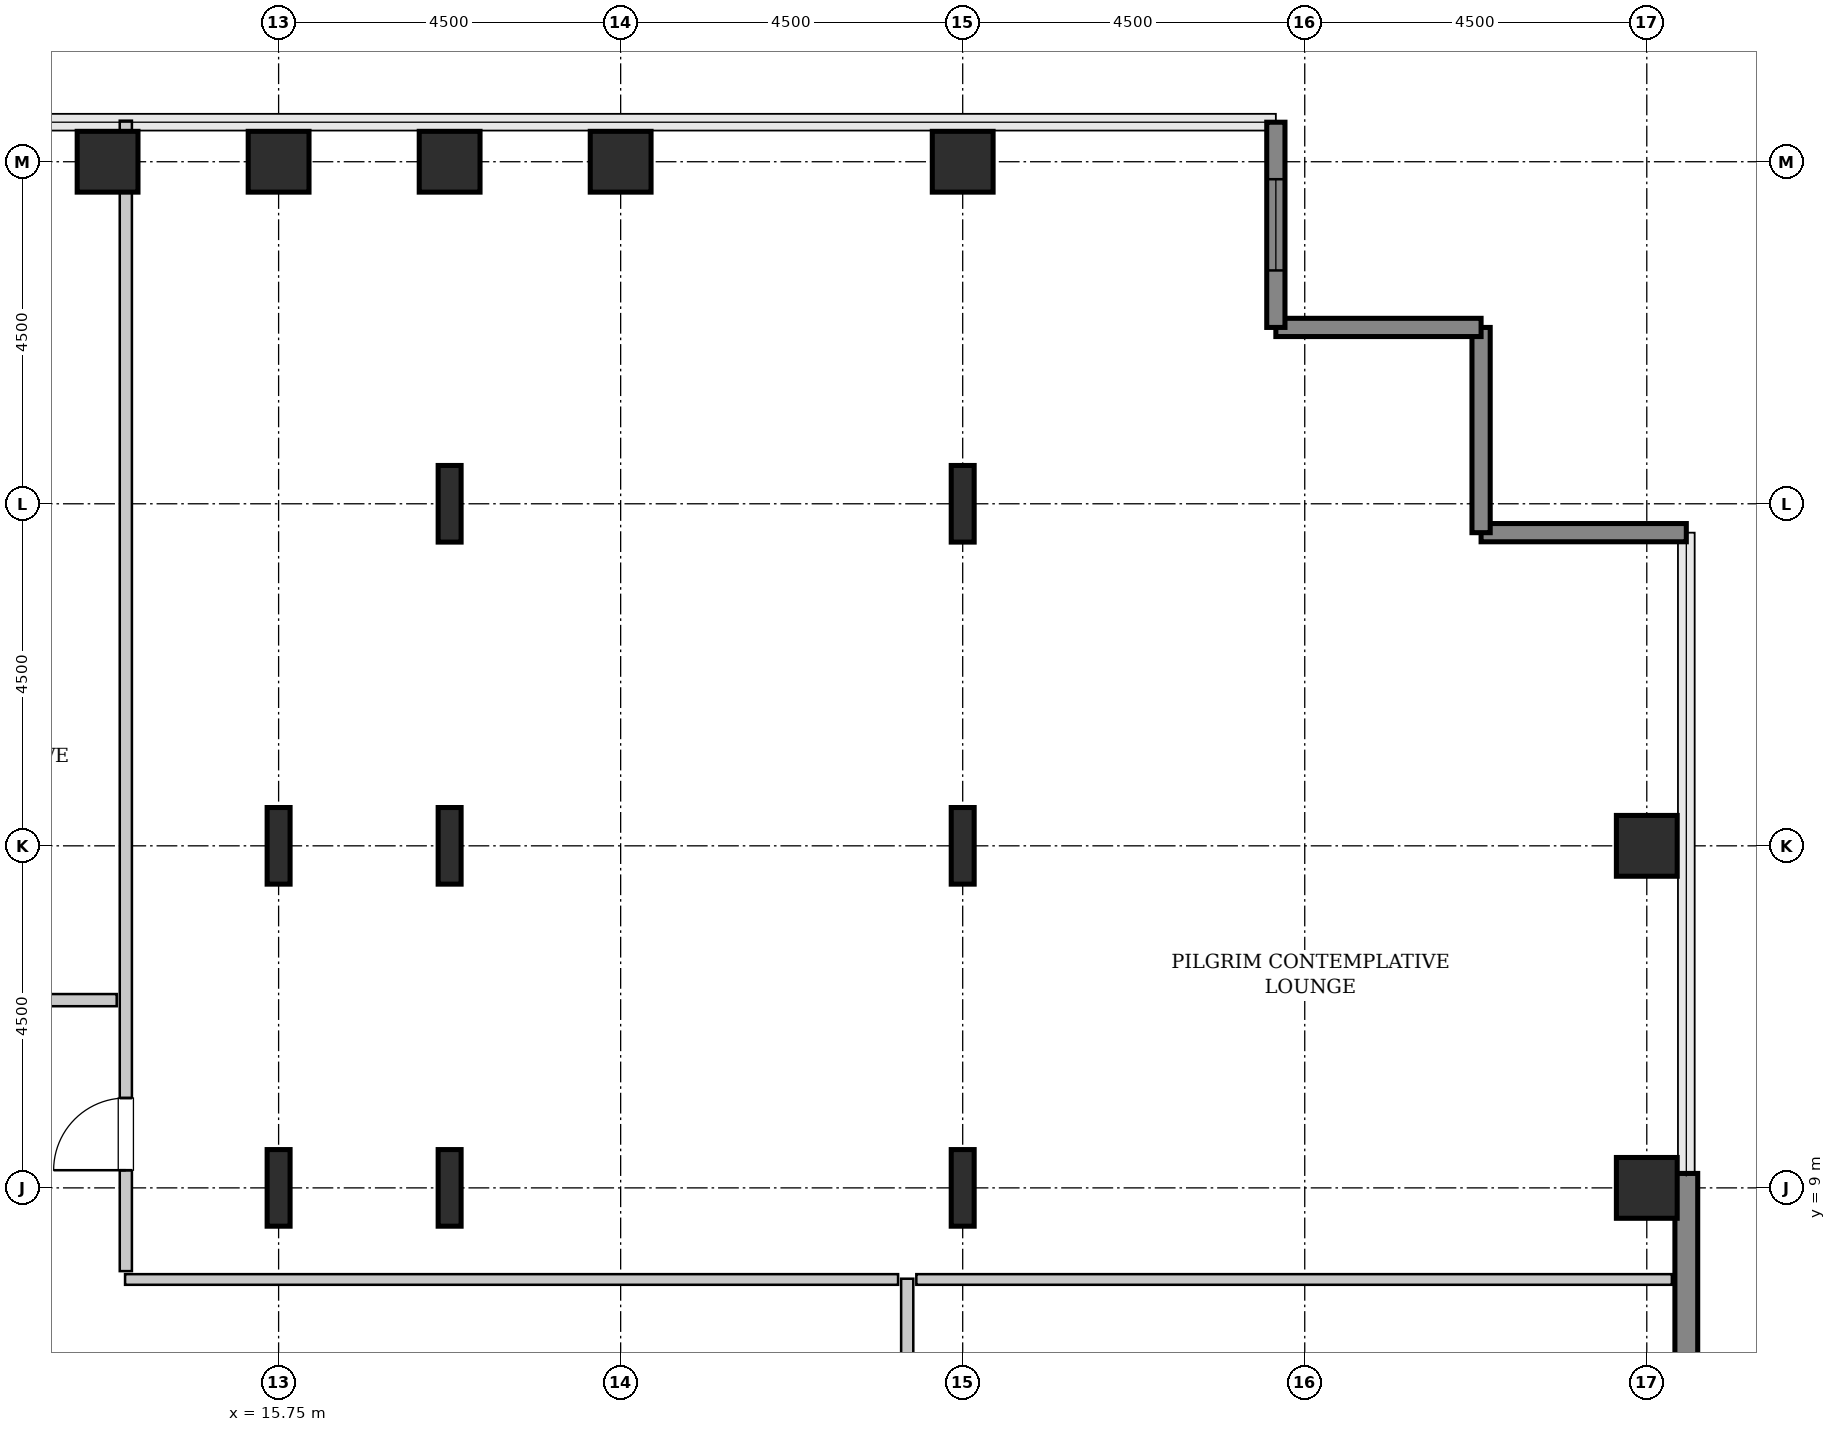
"""IFC4 building model, lengths in metres.
Left out: names, types, materials, properties, quantities, classifications, styles, units other than length and angle.
Written with IfcOpenShell. Run it as: python <this file> out.ifc"""

import sys

from ifc_helpers import new_model, si_unit, direction, frame, frame_2d, origin, origin_2d, place, context, subcontext, project, spatial, rectangle, hollow_rectangle, i_section, extrude, source, transform, mapped, element, fill, save


model = new_model("IFC4")
c1 = context("Model", 3, precision=1e-05, world=origin(), true_north=direction((0.0, 1.0)))
c2 = subcontext(c1, "Body", "Model", "MODEL_VIEW")
j1 = project(units=[si_unit("LENGTHUNIT", "METRE"), si_unit("PLANEANGLEUNIT", "RADIAN")], contexts=[c1])
p1 = place(None, origin())
s1 = spatial("IfcSite", under=j1, at=p1, CompositionType="ELEMENT")
p2 = place(p1, origin())
s2 = spatial("IfcBuilding", under=s1, at=p2, CompositionType="ELEMENT")
p3 = place(p2, frame((0.0, 0.0, 113.6)))
s3 = spatial("IfcBuildingStorey", under=s2, at=p3, CompositionType="ELEMENT", Elevation=113.6)
m1 = source(origin(), c2, "Body", "SweptSolid", [
    extrude(hollow_rectangle(XDim=0.8, YDim=0.8, WallThickness=0.04, InnerFilletRadius=0.04, OuterFilletRadius=0.08, at=origin_2d()), origin(), (0.0, 0.0, 1.0), 3.8),
])
p4 = place(p3, frame((13.5, 22.5, 0.0), z_axis=(0.0, 0.0, 1.0), x_axis=(1.0, 0.0, 0.0)))
e1 = element("IfcColumn", 1, at=p4, inside=s3, PredefinedType="COLUMN", context=c2, shape_type="MappedRepresentation", body=[
    mapped(m1, transform((0.0, 0.0, 0.0), x_axis=(1.0, 0.0, 0.0), y_axis=(0.0, 1.0, 0.0), z_axis=(0.0, 0.0, 1.0), scale=1.0)),
])
m2 = source(origin(), c2, "Body", "SweptSolid", [
    extrude(i_section(OverallWidth=0.302, OverallDepth=1.008, WebThickness=0.021, FlangeThickness=0.04, FilletRadius=0.03, at=origin_2d()), origin(), (0.0, 0.0, 1.0), 3.8),
])
for number, where, z_axis, x_axis in (
    (2, (15.75, 9.0, 0.0), (0.0, 0.0, 1.0), (1.0, 0.0, 0.0)),
    (3, (15.75, 13.5, 0.0), (0.0, 0.0, 1.0), (1.0, 0.0, 0.0)),
):
    element("IfcColumn", number, at=place(p3, frame(where, z_axis=z_axis, x_axis=x_axis)), inside=s3, PredefinedType="COLUMN", context=c2, shape_type="MappedRepresentation", body=[
        mapped(m2, transform((0.0, 0.0, 0.0), x_axis=(1.0, 0.0, 0.0), y_axis=(0.0, 1.0, 0.0), z_axis=(0.0, 0.0, 1.0), scale=1.0)),
    ])
p5 = place(p3, frame((15.75, 22.5, 0.0), z_axis=(0.0, 0.0, 1.0), x_axis=(1.0, 0.0, 0.0)))
e4 = element("IfcColumn", 4, at=p5, inside=s3, PredefinedType="COLUMN", context=c2, shape_type="MappedRepresentation", body=[
    mapped(m1, transform((0.0, 0.0, 0.0), x_axis=(1.0, 0.0, 0.0), y_axis=(0.0, 1.0, 0.0), z_axis=(0.0, 0.0, 1.0), scale=1.0)),
])
for number, where, z_axis, x_axis in (
    (5, (18.0, 9.0, 0.0), (0.0, 0.0, 1.0), (1.0, 0.0, 0.0)),
    (6, (18.0, 13.5, 0.0), (0.0, 0.0, 1.0), (1.0, 0.0, 0.0)),
    (7, (18.0, 18.0, 0.0), (0.0, 0.0, 1.0), (1.0, 0.0, 0.0)),
):
    element("IfcColumn", number, at=place(p3, frame(where, z_axis=z_axis, x_axis=x_axis)), inside=s3, PredefinedType="COLUMN", context=c2, shape_type="MappedRepresentation", body=[
        mapped(m2, transform((0.0, 0.0, 0.0), x_axis=(1.0, 0.0, 0.0), y_axis=(0.0, 1.0, 0.0), z_axis=(0.0, 0.0, 1.0), scale=1.0)),
    ])
for number, where, z_axis, x_axis in (
    (8, (18.0, 22.5, 0.0), (0.0, 0.0, 1.0), (1.0, 0.0, 0.0)),
    (9, (20.25, 22.5, 0.0), (0.0, 0.0, 1.0), (1.0, 0.0, 0.0)),
):
    element("IfcColumn", number, at=place(p3, frame(where, z_axis=z_axis, x_axis=x_axis)), inside=s3, PredefinedType="COLUMN", context=c2, shape_type="MappedRepresentation", body=[
        mapped(m1, transform((0.0, 0.0, 0.0), x_axis=(1.0, 0.0, 0.0), y_axis=(0.0, 1.0, 0.0), z_axis=(0.0, 0.0, 1.0), scale=1.0)),
    ])
for number, where, z_axis, x_axis in (
    (10, (24.75, 9.0, 0.0), (0.0, 0.0, 1.0), (1.0, 0.0, 0.0)),
    (11, (24.75, 13.5, 0.0), (0.0, 0.0, 1.0), (1.0, 0.0, 0.0)),
    (12, (24.75, 18.0, 0.0), (0.0, 0.0, 1.0), (1.0, 0.0, 0.0)),
):
    element("IfcColumn", number, at=place(p3, frame(where, z_axis=z_axis, x_axis=x_axis)), inside=s3, PredefinedType="COLUMN", context=c2, shape_type="MappedRepresentation", body=[
        mapped(m2, transform((0.0, 0.0, 0.0), x_axis=(1.0, 0.0, 0.0), y_axis=(0.0, 1.0, 0.0), z_axis=(0.0, 0.0, 1.0), scale=1.0)),
    ])
for number, where, z_axis, x_axis in (
    (13, (24.75, 22.5, 0.0), (0.0, 0.0, 1.0), (1.0, 0.0, 0.0)),
    (14, (33.75, 9.0, 0.0), (0.0, 0.0, 1.0), (1.0, 0.0, 0.0)),
    (15, (33.75, 13.5, 0.0), (0.0, 0.0, 1.0), (1.0, 0.0, 0.0)),
):
    element("IfcColumn", number, at=place(p3, frame(where, z_axis=z_axis, x_axis=x_axis)), inside=s3, PredefinedType="COLUMN", context=c2, shape_type="MappedRepresentation", body=[
        mapped(m1, transform((0.0, 0.0, 0.0), x_axis=(1.0, 0.0, 0.0), y_axis=(0.0, 1.0, 0.0), z_axis=(0.0, 0.0, 1.0), scale=1.0)),
    ])
m3 = source(origin(), c2, "Body", "SweptSolid", [
    extrude(rectangle(XDim=4.88, YDim=0.3, at=frame_2d((2.44, 0.0))), origin(), (0.0, 0.0, 1.0), 3.55),
])
p6 = place(p3, frame((34.27, 4.31, 0.0), z_axis=(0.0, 0.0, 1.0), x_axis=(0.0, 1.0, 0.0)))
e16 = element("IfcWall", 16, at=p6, inside=s3, PredefinedType="SHEAR", context=c2, shape_type="MappedRepresentation", body=[
    mapped(m3, transform((0.0, 0.0, 0.0), x_axis=(1.0, 0.0, 0.0), y_axis=(0.0, 1.0, 0.0), z_axis=(0.0, 0.0, 1.0), scale=1.0)),
])
m4 = source(origin(), c2, "Body", "SweptSolid", [
    extrude(rectangle(XDim=2.7, YDim=0.24, at=frame_2d((1.35, 0.0))), origin(), (0.0, 0.0, 1.0), 3.55),
])
for number, where, z_axis, x_axis in (
    (17, (34.27, 17.62, 0.0), (0.0, 0.0, 1.0), (-1.0, 0.0, 0.0)),
    (18, (31.57, 17.62, 0.0), (0.0, 0.0, 1.0), (0.0, 1.0, 0.0)),
    (19, (31.57, 20.32, 0.0), (0.0, 0.0, 1.0), (-1.0, 0.0, 0.0)),
):
    element("IfcWall", number, at=place(p3, frame(where, z_axis=z_axis, x_axis=x_axis)), inside=s3, PredefinedType="SHEAR", context=c2, shape_type="MappedRepresentation", body=[
        mapped(m4, transform((0.0, 0.0, 0.0), x_axis=(1.0, 0.0, 0.0), y_axis=(0.0, 1.0, 0.0), z_axis=(0.0, 0.0, 1.0), scale=1.0)),
    ])
p7 = place(p3, frame((28.87, 20.32, 0.0), z_axis=(0.0, 0.0, 1.0), x_axis=(0.0, 1.0, 0.0)))
e20 = element("IfcWall", 20, at=p7, inside=s3, PredefinedType="SHEAR", context=c2, shape_type="MappedRepresentation", body=[
    mapped(m4, transform((0.0, 0.0, 0.0), x_axis=(1.0, 0.0, 0.0), y_axis=(0.0, 1.0, 0.0), z_axis=(0.0, 0.0, 1.0), scale=1.0)),
])
p8 = place(p7, frame((0.75, 0.0, 0.85)))
e21 = element("IfcOpeningElement", 21, at=p8, cuts=e20, PredefinedType="OPENING", context=c2, shape_type="SweptSolid", body=[
    extrude(rectangle(XDim=1.2, YDim=1.8, at=frame_2d((0.6, 0.9))), frame((0.0, 0.13, 0.0), z_axis=(0.0, -1.0, 0.0), x_axis=(1.0, 0.0, 0.0)), (0.0, 0.0, 1.0), 0.26),
])
m5 = source(origin(), c2, "Body", "SweptSolid", [
    extrude(rectangle(XDim=15.5, YDim=0.16, at=frame_2d((7.75, 0.0))), origin(), (0.0, 0.0, 1.0), 3.535),
])
p9 = place(p3, frame((24.02, -7.695, 0.0), z_axis=(0.0, 0.0, 1.0), x_axis=(0.0, 1.0, 0.0)))
e22 = element("IfcWall", 22, at=p9, inside=s3, PredefinedType="PARTITIONING", context=c2, shape_type="MappedRepresentation", body=[
    mapped(m5, transform((0.0, 0.0, 0.0), x_axis=(1.0, 0.0, 0.0), y_axis=(0.0, 1.0, 0.0), z_axis=(0.0, 0.0, 1.0), scale=1.0)),
])
p10 = place(p9, frame((9.47, 0.0, 0.0)))
e23 = element("IfcOpeningElement", 23, at=p10, cuts=e22, PredefinedType="OPENING", context=c2, shape_type="SweptSolid", body=[
    extrude(rectangle(XDim=0.95, YDim=2.1, at=frame_2d((0.475, 1.05))), frame((0.0, 0.09, 0.0), z_axis=(0.0, -1.0, 0.0), x_axis=(1.0, 0.0, 0.0)), (0.0, 0.0, 1.0), 0.18),
])
m6 = source(origin(), c2, "Body", "SweptSolid", [
    extrude(rectangle(XDim=10.17, YDim=0.14, at=frame_2d((5.085, 0.0))), origin(), (0.0, 0.0, 1.0), 3.535),
])
p11 = place(p3, frame((13.73, 7.795, 0.0), z_axis=(0.0, 0.0, 1.0), x_axis=(1.0, 0.0, 0.0)))
e24 = element("IfcWall", 24, at=p11, inside=s3, PredefinedType="PARTITIONING", context=c2, shape_type="MappedRepresentation", body=[
    mapped(m6, transform((0.0, 0.0, 0.0), x_axis=(1.0, 0.0, 0.0), y_axis=(0.0, 1.0, 0.0), z_axis=(0.0, 0.0, 1.0), scale=1.0)),
])
m7 = source(origin(), c2, "Body", "SweptSolid", [
    extrude(rectangle(XDim=9.94, YDim=0.14, at=frame_2d((4.97, 0.0))), origin(), (0.0, 0.0, 1.0), 3.535),
])
p12 = place(p3, frame((24.14, 7.795, 0.0), z_axis=(0.0, 0.0, 1.0), x_axis=(1.0, 0.0, 0.0)))
e25 = element("IfcWall", 25, at=p12, inside=s3, PredefinedType="PARTITIONING", context=c2, shape_type="MappedRepresentation", body=[
    mapped(m7, transform((0.0, 0.0, 0.0), x_axis=(1.0, 0.0, 0.0), y_axis=(0.0, 1.0, 0.0), z_axis=(0.0, 0.0, 1.0), scale=1.0)),
])
m8 = source(origin(), c2, "Body", "SweptSolid", [
    extrude(rectangle(XDim=15.135, YDim=0.16, at=frame_2d((7.567, 0.0))), origin(), (0.0, 0.0, 1.0), 3.535),
])
p13 = place(p3, frame((13.74, 7.905, 0.0), z_axis=(0.0, 0.0, 1.0), x_axis=(0.0, 1.0, 0.0)))
e26 = element("IfcWall", 26, at=p13, inside=s3, PredefinedType="PARTITIONING", context=c2, shape_type="MappedRepresentation", body=[
    mapped(m8, transform((0.0, 0.0, 0.0), x_axis=(1.0, 0.0, 0.0), y_axis=(0.0, 1.0, 0.0), z_axis=(0.0, 0.0, 1.0), scale=1.0)),
])
p14 = place(p13, frame((1.327, 0.0, 0.0)))
e27 = element("IfcOpeningElement", 27, at=p14, cuts=e26, PredefinedType="OPENING", context=c2, shape_type="SweptSolid", body=[
    extrude(rectangle(XDim=0.95, YDim=2.1, at=frame_2d((0.475, 1.05))), frame((0.0, 0.09, 0.0), z_axis=(0.0, -1.0, 0.0), x_axis=(1.0, 0.0, 0.0)), (0.0, 0.0, 1.0), 0.18),
])
m9 = source(origin(), c2, "Body", "SweptSolid", [
    extrude(rectangle(XDim=3.66, YDim=0.16, at=frame_2d((1.83, 0.0))), origin(), (0.0, 0.0, 1.0), 3.535),
])
p15 = place(p3, frame((9.96, 11.47, 0.0), z_axis=(0.0, 0.0, 1.0), x_axis=(1.0, 0.0, 0.0)))
e28 = element("IfcWall", 28, at=p15, inside=s3, PredefinedType="PARTITIONING", context=c2, shape_type="MappedRepresentation", body=[
    mapped(m9, transform((0.0, 0.0, 0.0), x_axis=(1.0, 0.0, 0.0), y_axis=(0.0, 1.0, 0.0), z_axis=(0.0, 0.0, 1.0), scale=1.0)),
])
p16 = place(p15, frame((1.355, 0.0, 0.0)))
e29 = element("IfcOpeningElement", 29, at=p16, cuts=e28, PredefinedType="OPENING", context=c2, shape_type="SweptSolid", body=[
    extrude(rectangle(XDim=0.95, YDim=2.1, at=frame_2d((0.475, 1.05))), frame((0.0, 0.09, 0.0), z_axis=(0.0, -1.0, 0.0), x_axis=(1.0, 0.0, 0.0)), (0.0, 0.0, 1.0), 0.18),
])
m10 = source(origin(), c2, "Body", "SweptSolid", [
    extrude(rectangle(XDim=1.2, YDim=1.8, at=frame_2d((0.6, 0.9))), frame((0.0, 0.03, 0.0), z_axis=(0.0, -1.0, 0.0), x_axis=(1.0, 0.0, 0.0)), (0.0, 0.0, 1.0), 0.06),
])
p17 = place(p8, origin())
e30 = element("IfcWindow", 30, at=p17, inside=s3, PartitioningType="SINGLE_PANEL", PredefinedType="WINDOW", context=c2, shape_type="MappedRepresentation", body=[
    mapped(m10, transform((0.0, 0.0, 0.0), x_axis=(1.0, 0.0, 0.0), y_axis=(0.0, 1.0, 0.0), z_axis=(0.0, 0.0, 1.0), scale=1.0)),
])
fill(e21, e30)
m11 = source(origin(), c2, "Body", "SweptSolid", [
    extrude(rectangle(XDim=0.95, YDim=2.1, at=frame_2d((0.475, 1.05))), frame((0.0, 0.025, 0.0), z_axis=(0.0, -1.0, 0.0), x_axis=(1.0, 0.0, 0.0)), (0.0, 0.0, 1.0), 0.05),
])
p18 = place(p14, origin())
e31 = element("IfcDoor", 31, at=p18, inside=s3, OperationType="SINGLE_SWING_LEFT", PredefinedType="DOOR", context=c2, shape_type="MappedRepresentation", body=[
    mapped(m11, transform((0.0, 0.0, 0.0), x_axis=(1.0, 0.0, 0.0), y_axis=(0.0, 1.0, 0.0), z_axis=(0.0, 0.0, 1.0), scale=1.0)),
])
fill(e27, e31)
save(model, sys.argv[1])
